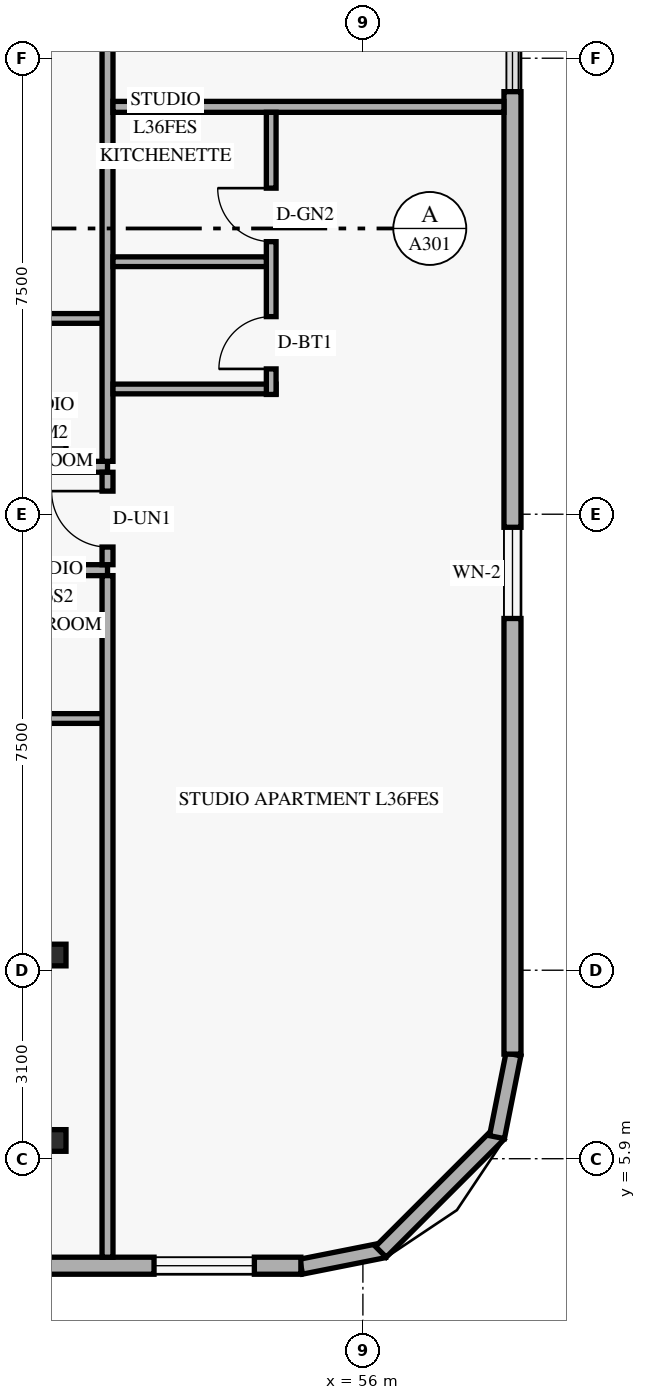
"""IFC4 building model, lengths in metres.
Left out: names, types, materials, properties, quantities, classifications, styles, units other than length and angle.
Written with IfcOpenShell. Run it as: python <this file> out.ifc"""

import sys

from ifc_helpers import new_model, si_unit, direction, frame, frame_2d, origin, origin_2d, place, context, subcontext, project, spatial, rectangle, hollow_rectangle, extrude, element, fill, save


model = new_model("IFC4")
c1 = context("Model", 3, precision=1e-05, world=origin(), true_north=direction((0.0, 1.0)))
c2 = subcontext(c1, "Body", "Model", "MODEL_VIEW")
j1 = project(units=[si_unit("LENGTHUNIT", "METRE"), si_unit("PLANEANGLEUNIT", "RADIAN")], contexts=[c1])
p1 = place(None, origin())
s1 = spatial("IfcSite", under=j1, at=p1, CompositionType="ELEMENT")
p2 = place(p1, origin())
s2 = spatial("IfcBuilding", under=s1, at=p2, CompositionType="ELEMENT")
p3 = place(p2, frame((0.0, 0.0, 141.0)))
s3 = spatial("IfcBuildingStorey", under=s2, at=p3, CompositionType="ELEMENT", Elevation=141.0)
for number, where, z_axis, x_axis in (
    (1, (50.835, 6.2, 0.0), (0.058, 0.0, 0.998), (0.0, 1.0, 0.0)),
    (2, (50.835, 9.25, 0.0), (0.058, 0.0, 0.998), (0.0, 1.0, 0.0)),
    (3, (50.835, 17.55, 0.0), (0.058, 0.0, 0.998), (0.0, 1.0, 0.0)),
):
    element("IfcColumn", number, at=place(p3, frame(where, z_axis=z_axis, x_axis=x_axis)), inside=s3, PredefinedType="COLUMN", context=c2, shape_type="SweptSolid", body=[
        extrude(hollow_rectangle(XDim=0.356, YDim=0.356, WallThickness=0.016, at=origin_2d()), origin(), (0.0, 0.0, 1.0), 3.606),
    ])
p4 = place(p3, frame((54.983, 4.124, 0.0), z_axis=(0.0, 0.0, 1.0), x_axis=(0.980809899341, 0.19496651342, 0.0)))
e4 = element("IfcWall", 4, at=p4, inside=s3, PredefinedType="SOLIDWALL", context=c2, shape_type="SweptSolid", body=[
    extrude(rectangle(XDim=1.389, YDim=0.25, at=frame_2d((0.694, 0.0))), origin(), (0.0, 0.0, 1.0), 3.36),
])
p5 = place(p3, frame((56.295, 4.368, 0.0), z_axis=(0.0, 0.0, 1.0), x_axis=(0.707106781187, 0.707106781187, 0.0)))
e5 = element("IfcWall", 5, at=p5, inside=s3, PredefinedType="SOLIDWALL", context=c2, shape_type="SweptSolid", body=[
    extrude(rectangle(XDim=2.739, YDim=0.25, at=frame_2d((1.37, 0.0))), origin(), (0.0, 0.0, 1.0), 3.36),
])
p6 = place(p3, frame((58.205, 6.254, 0.0), z_axis=(0.0, 0.0, 1.0), x_axis=(0.19496651342, 0.980809899341, 0.0)))
e6 = element("IfcWall", 6, at=p6, inside=s3, PredefinedType="SOLIDWALL", context=c2, shape_type="SweptSolid", body=[
    extrude(rectangle(XDim=1.389, YDim=0.25, at=frame_2d((0.694, 0.0))), origin(), (0.0, 0.0, 1.0), 3.36),
])
p7 = place(p3, frame((21.22, 4.14, 0.0), z_axis=(0.0, 0.0, 1.0), x_axis=(1.0, 0.0, 0.0)))
e7 = element("IfcWall", 7, at=p7, inside=s3, PredefinedType="SOLIDWALL", context=c2, shape_type="SweptSolid", body=[
    extrude(rectangle(XDim=33.76, YDim=0.28, at=frame_2d((16.88, 0.0))), origin(), (0.0, 0.0, 1.0), 3.36),
])
p8 = place(p7, frame((2.33, 0.0, 0.85)))
e8 = element("IfcOpeningElement", 8, at=p8, cuts=e7, PredefinedType="OPENING", context=c2, shape_type="SweptSolid", body=[
    extrude(rectangle(XDim=1.65, YDim=1.6, at=frame_2d((0.825, 0.8))), frame((0.0, 0.15, 0.0), z_axis=(0.0, -1.0, 0.0), x_axis=(1.0, 0.0, 0.0)), (0.0, 0.0, 1.0), 0.3),
])
p9 = place(p7, frame((9.215, 0.0, 0.85)))
e9 = element("IfcOpeningElement", 9, at=p9, cuts=e7, PredefinedType="OPENING", context=c2, shape_type="SweptSolid", body=[
    extrude(rectangle(XDim=1.65, YDim=1.6, at=frame_2d((0.825, 0.8))), frame((0.0, 0.15, 0.0), z_axis=(0.0, -1.0, 0.0), x_axis=(1.0, 0.0, 0.0)), (0.0, 0.0, 1.0), 0.3),
])
p10 = place(p7, frame((14.64, 0.0, 0.85)))
e10 = element("IfcOpeningElement", 10, at=p10, cuts=e7, PredefinedType="OPENING", context=c2, shape_type="SweptSolid", body=[
    extrude(rectangle(XDim=1.65, YDim=1.6, at=frame_2d((0.825, 0.8))), frame((0.0, 0.15, 0.0), z_axis=(0.0, -1.0, 0.0), x_axis=(1.0, 0.0, 0.0)), (0.0, 0.0, 1.0), 0.3),
])
p11 = place(p7, frame((19.367, 0.0, 0.85)))
e11 = element("IfcOpeningElement", 11, at=p11, cuts=e7, PredefinedType="OPENING", context=c2, shape_type="SweptSolid", body=[
    extrude(rectangle(XDim=1.65, YDim=1.6, at=frame_2d((0.825, 0.8))), frame((0.0, 0.15, 0.0), z_axis=(0.0, -1.0, 0.0), x_axis=(1.0, 0.0, 0.0)), (0.0, 0.0, 1.0), 0.3),
])
p12 = place(p7, frame((26.292, 0.0, 0.85)))
e12 = element("IfcOpeningElement", 12, at=p12, cuts=e7, PredefinedType="OPENING", context=c2, shape_type="SweptSolid", body=[
    extrude(rectangle(XDim=1.65, YDim=1.6, at=frame_2d((0.825, 0.8))), frame((0.0, 0.15, 0.0), z_axis=(0.0, -1.0, 0.0), x_axis=(1.0, 0.0, 0.0)), (0.0, 0.0, 1.0), 0.3),
])
p13 = place(p7, frame((31.345, 0.0, 0.85)))
e13 = element("IfcOpeningElement", 13, at=p13, cuts=e7, PredefinedType="OPENING", context=c2, shape_type="SweptSolid", body=[
    extrude(rectangle(XDim=1.65, YDim=1.6, at=frame_2d((0.825, 0.8))), frame((0.0, 0.15, 0.0), z_axis=(0.0, -1.0, 0.0), x_axis=(1.0, 0.0, 0.0)), (0.0, 0.0, 1.0), 0.3),
])
p14 = place(p3, frame((58.46, 7.62, 0.0), z_axis=(0.0, 0.0, 1.0), x_axis=(0.0, 1.0, 0.0)))
e14 = element("IfcWall", 14, at=p14, inside=s3, PredefinedType="SOLIDWALL", context=c2, shape_type="SweptSolid", body=[
    extrude(rectangle(XDim=15.83, YDim=0.28, at=frame_2d((7.915, 0.0))), origin(), (0.0, 0.0, 1.0), 3.36),
])
p15 = place(p14, frame((7.165, 0.0, 0.85)))
e15 = element("IfcOpeningElement", 15, at=p15, cuts=e14, PredefinedType="OPENING", context=c2, shape_type="SweptSolid", body=[
    extrude(rectangle(XDim=1.5, YDim=1.55, at=frame_2d((0.75, 0.775))), frame((0.0, 0.15, 0.0), z_axis=(0.0, -1.0, 0.0), x_axis=(1.0, 0.0, 0.0)), (0.0, 0.0, 1.0), 0.3),
])
p16 = place(p3, frame((38.032, 15.58, 0.0), z_axis=(0.0, 0.0, 1.0), x_axis=(1.0, 0.0, 0.0)))
e16 = element("IfcWall", 16, at=p16, inside=s3, PredefinedType="STANDARD", context=c2, shape_type="SweptSolid", body=[
    extrude(rectangle(XDim=13.768, YDim=0.18, at=frame_2d((6.884, 0.0))), origin(), (0.0, 0.0, 1.0), 2.73),
])
p17 = place(p16, frame((0.357, 0.0, 0.0)))
e17 = element("IfcOpeningElement", 17, at=p17, cuts=e16, PredefinedType="OPENING", context=c2, shape_type="SweptSolid", body=[
    extrude(rectangle(XDim=0.92, YDim=2.15, at=frame_2d((0.46, 1.075))), frame((0.0, 0.1, 0.0), z_axis=(0.0, -1.0, 0.0), x_axis=(1.0, 0.0, 0.0)), (0.0, 0.0, 1.0), 0.2),
])
p18 = place(p16, frame((7.282, 0.0, 0.0)))
e18 = element("IfcOpeningElement", 18, at=p18, cuts=e16, PredefinedType="OPENING", context=c2, shape_type="SweptSolid", body=[
    extrude(rectangle(XDim=0.92, YDim=2.15, at=frame_2d((0.46, 1.075))), frame((0.0, 0.1, 0.0), z_axis=(0.0, -1.0, 0.0), x_axis=(1.0, 0.0, 0.0)), (0.0, 0.0, 1.0), 0.2),
])
p19 = place(p3, frame((37.64, 17.28, 0.0), z_axis=(0.0, 0.0, 1.0), x_axis=(1.0, 0.0, 0.0)))
e19 = element("IfcWall", 19, at=p19, inside=s3, PredefinedType="STANDARD", context=c2, shape_type="SweptSolid", body=[
    extrude(rectangle(XDim=14.16, YDim=0.18, at=frame_2d((7.08, 0.0))), origin(), (0.0, 0.0, 1.0), 2.73),
])
p20 = place(p19, frame((7.895, 0.0, 0.0)))
e20 = element("IfcOpeningElement", 20, at=p20, cuts=e19, PredefinedType="OPENING", context=c2, shape_type="SweptSolid", body=[
    extrude(rectangle(XDim=0.92, YDim=2.15, at=frame_2d((0.46, 1.075))), frame((0.0, 0.1, 0.0), z_axis=(0.0, -1.0, 0.0), x_axis=(1.0, 0.0, 0.0)), (0.0, 0.0, 1.0), 0.2),
])
p21 = place(p3, frame((47.13, 13.14, 0.0), z_axis=(0.0, 0.0, 1.0), x_axis=(1.0, 0.0, 0.0)))
e21 = element("IfcWall", 21, at=p21, inside=s3, PredefinedType="PLUMBINGWALL", context=c2, shape_type="SweptSolid", body=[
    extrude(rectangle(XDim=4.67, YDim=0.16, at=frame_2d((2.335, 0.0))), origin(), (0.0, 0.0, 1.0), 2.879),
])
p22 = place(p21, frame((0.35, 0.0, 0.0)))
e22 = element("IfcOpeningElement", 22, at=p22, cuts=e21, PredefinedType="OPENING", context=c2, shape_type="SweptSolid", body=[
    extrude(rectangle(XDim=0.88, YDim=2.12, at=frame_2d((0.44, 1.06))), frame((0.0, 0.09, 0.0), z_axis=(0.0, -1.0, 0.0), x_axis=(1.0, 0.0, 0.0)), (0.0, 0.0, 1.0), 0.18),
])
p23 = place(p21, frame((2.72, 0.0, 0.0)))
e23 = element("IfcOpeningElement", 23, at=p23, cuts=e21, PredefinedType="OPENING", context=c2, shape_type="SweptSolid", body=[
    extrude(rectangle(XDim=0.86, YDim=2.12, at=frame_2d((0.43, 1.06))), frame((0.0, 0.09, 0.0), z_axis=(0.0, -1.0, 0.0), x_axis=(1.0, 0.0, 0.0)), (0.0, 0.0, 1.0), 0.18),
])
p24 = place(p3, frame((47.13, 19.72, 0.0), z_axis=(0.0, 0.0, 1.0), x_axis=(1.0, 0.0, 0.0)))
e24 = element("IfcWall", 24, at=p24, inside=s3, PredefinedType="PLUMBINGWALL", context=c2, shape_type="SweptSolid", body=[
    extrude(rectangle(XDim=4.67, YDim=0.16, at=frame_2d((2.335, 0.0))), origin(), (0.0, 0.0, 1.0), 2.879),
])
p25 = place(p24, frame((0.35, 0.0, 0.0)))
e25 = element("IfcOpeningElement", 25, at=p25, cuts=e24, PredefinedType="OPENING", context=c2, shape_type="SweptSolid", body=[
    extrude(rectangle(XDim=0.88, YDim=2.12, at=frame_2d((0.44, 1.06))), frame((0.0, 0.09, 0.0), z_axis=(0.0, -1.0, 0.0), x_axis=(1.0, 0.0, 0.0)), (0.0, 0.0, 1.0), 0.18),
])
p26 = place(p24, frame((2.72, 0.0, 0.0)))
e26 = element("IfcOpeningElement", 26, at=p26, cuts=e24, PredefinedType="OPENING", context=c2, shape_type="SweptSolid", body=[
    extrude(rectangle(XDim=0.86, YDim=2.12, at=frame_2d((0.43, 1.06))), frame((0.0, 0.09, 0.0), z_axis=(0.0, -1.0, 0.0), x_axis=(1.0, 0.0, 0.0)), (0.0, 0.0, 1.0), 0.18),
])
p27 = place(p3, frame((51.8, 15.67, 0.0), z_axis=(0.0, 0.0, 1.0), x_axis=(0.0, 1.0, 0.0)))
e27 = element("IfcWall", 27, at=p27, inside=s3, PredefinedType="STANDARD", context=c2, shape_type="SweptSolid", body=[
    extrude(rectangle(XDim=1.52, YDim=0.18, at=frame_2d((0.76, 0.0))), origin(), (0.0, 0.0, 1.0), 3.36),
])
p28 = place(p27, frame((0.29, 0.0, 0.0)))
e28 = element("IfcOpeningElement", 28, at=p28, cuts=e27, PredefinedType="OPENING", context=c2, shape_type="SweptSolid", body=[
    extrude(rectangle(XDim=0.92, YDim=2.15, at=frame_2d((0.46, 1.075))), frame((0.0, 0.1, 0.0), z_axis=(0.0, -1.0, 0.0), x_axis=(1.0, 0.0, 0.0)), (0.0, 0.0, 1.0), 0.2),
])
p29 = place(p3, frame((51.8, 4.28, 0.0), z_axis=(0.0, 0.0, 1.0), x_axis=(0.0, 1.0, 0.0)))
e29 = element("IfcWall", 29, at=p29, inside=s3, PredefinedType="PARTITIONING", context=c2, shape_type="SweptSolid", body=[
    extrude(rectangle(XDim=11.21, YDim=0.18, at=frame_2d((5.605, 0.0))), origin(), (0.0, 0.0, 1.0), 3.36),
])
p30 = place(p3, frame((51.8, 17.37, 0.0), z_axis=(0.0, 0.0, 1.0), x_axis=(0.0, 1.0, 0.0)))
e30 = element("IfcWall", 30, at=p30, inside=s3, PredefinedType="PARTITIONING", context=c2, shape_type="SweptSolid", body=[
    extrude(rectangle(XDim=10.1, YDim=0.18, at=frame_2d((5.05, 0.0))), origin(), (0.0, 0.0, 1.0), 3.36),
])
p31 = place(p3, frame((51.89, 23.2, 0.0), z_axis=(0.0, 0.0, 1.0), x_axis=(1.0, 0.0, 0.0)))
e31 = element("IfcWall", 31, at=p31, inside=s3, PredefinedType="PARTITIONING", context=c2, shape_type="SweptSolid", body=[
    extrude(rectangle(XDim=6.43, YDim=0.18, at=frame_2d((3.215, 0.0))), origin(), (0.0, 0.0, 1.0), 3.36),
])
p32 = place(p3, frame((51.89, 18.56, 0.0), z_axis=(0.0, 0.0, 1.0), x_axis=(1.0, 0.0, 0.0)))
e32 = element("IfcWall", 32, at=p32, inside=s3, PredefinedType="PLUMBINGWALL", context=c2, shape_type="SweptSolid", body=[
    extrude(rectangle(XDim=2.682, YDim=0.16, at=frame_2d((1.341, 0.0))), origin(), (0.0, 0.0, 1.0), 3.36),
])
p33 = place(p3, frame((54.492, 18.47, 0.0), z_axis=(0.0, 0.0, 1.0), x_axis=(0.0, 1.0, 0.0)))
e33 = element("IfcWall", 33, at=p33, inside=s3, PredefinedType="PLUMBINGWALL", context=c2, shape_type="SweptSolid", body=[
    extrude(rectangle(XDim=4.64, YDim=0.16, at=frame_2d((2.32, 0.0))), origin(), (0.0, 0.0, 1.0), 3.36),
])
p34 = place(p33, frame((0.42, 0.0, 0.0)))
e34 = element("IfcOpeningElement", 34, at=p34, cuts=e33, PredefinedType="OPENING", context=c2, shape_type="SweptSolid", body=[
    extrude(rectangle(XDim=0.86, YDim=2.12, at=frame_2d((0.43, 1.06))), frame((0.0, 0.09, 0.0), z_axis=(0.0, -1.0, 0.0), x_axis=(1.0, 0.0, 0.0)), (0.0, 0.0, 1.0), 0.18),
])
p35 = place(p33, frame((2.513, 0.0, 0.0)))
e35 = element("IfcOpeningElement", 35, at=p35, cuts=e33, PredefinedType="OPENING", context=c2, shape_type="SweptSolid", body=[
    extrude(rectangle(XDim=0.88, YDim=2.12, at=frame_2d((0.44, 1.06))), frame((0.0, 0.09, 0.0), z_axis=(0.0, -1.0, 0.0), x_axis=(1.0, 0.0, 0.0)), (0.0, 0.0, 1.0), 0.18),
])
p36 = place(p3, frame((51.89, 20.653, 0.0), z_axis=(0.0, 0.0, 1.0), x_axis=(1.0, 0.0, 0.0)))
e36 = element("IfcWall", 36, at=p36, inside=s3, PredefinedType="PLUMBINGWALL", context=c2, shape_type="SweptSolid", body=[
    extrude(rectangle(XDim=2.522, YDim=0.16, at=frame_2d((1.261, 0.0))), origin(), (0.0, 0.0, 1.0), 3.36),
])
p37 = place(p13, origin())
e37 = element("IfcWindow", 37, at=p37, inside=s3, PartitioningType="SINGLE_PANEL", PredefinedType="WINDOW", context=c2, shape_type="SweptSolid", body=[
    extrude(rectangle(XDim=1.65, YDim=1.6, at=frame_2d((0.825, 0.8))), frame((0.0, 0.03, 0.0), z_axis=(0.0, -1.0, 0.0), x_axis=(1.0, 0.0, 0.0)), (0.0, 0.0, 1.0), 0.06),
])
fill(e13, e37)
p38 = place(p15, origin())
e38 = element("IfcWindow", 38, at=p38, inside=s3, PartitioningType="SINGLE_PANEL", PredefinedType="WINDOW", context=c2, shape_type="SweptSolid", body=[
    extrude(rectangle(XDim=1.5, YDim=1.55, at=frame_2d((0.75, 0.775))), frame((0.0, 0.03, 0.0), z_axis=(0.0, -1.0, 0.0), x_axis=(1.0, 0.0, 0.0)), (0.0, 0.0, 1.0), 0.06),
])
fill(e15, e38)
p39 = place(p28, origin())
e39 = element("IfcDoor", 39, at=p39, inside=s3, OperationType="SINGLE_SWING_RIGHT", PredefinedType="DOOR", context=c2, shape_type="SweptSolid", body=[
    extrude(rectangle(XDim=0.92, YDim=2.15, at=frame_2d((0.46, 1.075))), frame((0.0, 0.025, 0.0), z_axis=(0.0, -1.0, 0.0), x_axis=(1.0, 0.0, 0.0)), (0.0, 0.0, 1.0), 0.05),
])
fill(e28, e39)
p40 = place(p34, origin())
e40 = element("IfcDoor", 40, at=p40, inside=s3, OperationType="SINGLE_SWING_LEFT", PredefinedType="DOOR", context=c2, shape_type="SweptSolid", body=[
    extrude(rectangle(XDim=0.86, YDim=2.12, at=frame_2d((0.43, 1.06))), frame((0.0, 0.025, 0.0), z_axis=(0.0, -1.0, 0.0), x_axis=(1.0, 0.0, 0.0)), (0.0, 0.0, 1.0), 0.05),
])
fill(e34, e40)
p41 = place(p35, origin())
e41 = element("IfcDoor", 41, at=p41, inside=s3, OperationType="SINGLE_SWING_RIGHT", PredefinedType="DOOR", context=c2, shape_type="SweptSolid", body=[
    extrude(rectangle(XDim=0.88, YDim=2.12, at=frame_2d((0.44, 1.06))), frame((0.0, 0.025, 0.0), z_axis=(0.0, -1.0, 0.0), x_axis=(1.0, 0.0, 0.0)), (0.0, 0.0, 1.0), 0.05),
])
fill(e35, e41)
save(model, sys.argv[1])
